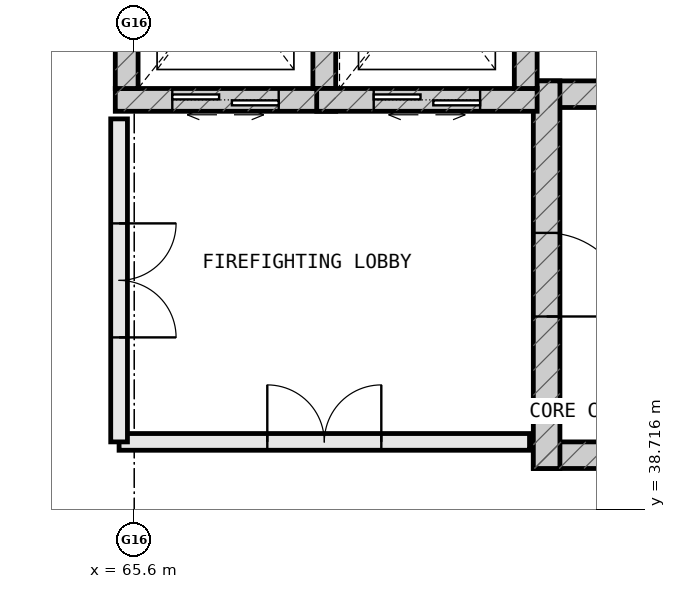
"""IFC4 building model, lengths in metres.
Left out: names, types, materials, properties, quantities, classifications, styles, units other than length and angle.
Written with IfcOpenShell. Run it as: python <this file> out.ifc"""

import sys

from ifc_helpers import new_model, si_unit, direction, frame, frame_2d, origin, place, context, subcontext, project, spatial, rectangle, extrude, element, fill, save


model = new_model("IFC4")
c1 = context("Model", 3, precision=1e-05, world=origin(), true_north=direction((0.0, 1.0)))
c2 = subcontext(c1, "Body", "Model", "MODEL_VIEW")
j1 = project(units=[si_unit("LENGTHUNIT", "METRE"), si_unit("PLANEANGLEUNIT", "RADIAN")], contexts=[c1])
p1 = place(None, origin())
s1 = spatial("IfcSite", under=j1, at=p1, CompositionType="ELEMENT")
p2 = place(p1, origin())
s2 = spatial("IfcBuilding", under=s1, at=p2, CompositionType="ELEMENT")
p3 = place(p2, frame((0.0, 0.0, 42.8)))
s3 = spatial("IfcBuildingStorey", under=s2, at=p3, CompositionType="ELEMENT", Elevation=42.8)
for number, where, z_axis, x_axis in (
    (1, (70.85, 39.425, 0.0), (0.0, 0.0, 1.0), (1.0, 0.0, 0.0)),
    (2, (82.95, 44.175, 0.0), (0.0, 0.0, 1.0), (-1.0, 0.0, 0.0)),
):
    element("IfcWall", number, at=place(p3, frame(where, z_axis=z_axis, x_axis=x_axis)), inside=s3, PredefinedType="SHEAR", context=c2, shape_type="SweptSolid", body=[
        extrude(rectangle(XDim=12.1, YDim=0.35, at=frame_2d((6.05, 0.0))), origin(), (0.0, 0.0, 1.0), 3.8),
    ])
p4 = place(p3, frame((71.025, 44.35, 0.0), z_axis=(0.0, 0.0, 1.0), x_axis=(0.0, -1.0, 0.0)))
e3 = element("IfcWall", 3, at=p4, inside=s3, PredefinedType="SHEAR", context=c2, shape_type="SweptSolid", body=[
    extrude(rectangle(XDim=5.1, YDim=0.35, at=frame_2d((2.55, 0.0))), origin(), (0.0, 0.0, 1.0), 3.8),
])
p5 = place(p4, frame((2.0, 0.0, 0.0)))
e4 = element("IfcOpeningElement", 4, at=p5, cuts=e3, PredefinedType="OPENING", context=c2, shape_type="SweptSolid", body=[
    extrude(rectangle(XDim=1.1, YDim=2.2, at=frame_2d((0.55, 1.1))), frame((0.0, 0.187, 0.0), z_axis=(0.0, -1.0, 0.0), x_axis=(1.0, 0.0, 0.0)), (0.0, 0.0, 1.0), 0.374),
])
p6 = place(p3, frame((65.35, 44.1, 0.0), z_axis=(0.0, 0.0, 1.0), x_axis=(1.0, 0.0, 0.0)))
e5 = element("IfcWall", 5, at=p6, inside=s3, PredefinedType="SHEAR", context=c2, shape_type="SweptSolid", body=[
    extrude(rectangle(XDim=2.9, YDim=0.3, at=frame_2d((1.45, 0.0))), origin(), (0.0, 0.0, 1.0), 3.8),
])
p7 = place(p6, frame((0.75, 0.0, 0.0)))
e6 = element("IfcOpeningElement", 6, at=p7, cuts=e5, PredefinedType="OPENING", context=c2, shape_type="SweptSolid", body=[
    extrude(rectangle(XDim=1.4, YDim=2.2, at=frame_2d((0.7, 1.1))), frame((0.0, 0.162, 0.0), z_axis=(0.0, -1.0, 0.0), x_axis=(1.0, 0.0, 0.0)), (0.0, 0.0, 1.0), 0.324),
])
for number, where, z_axis, x_axis in (
    (7, (68.1, 44.25, 0.0), (0.0, 0.0, 1.0), (0.0, 1.0, 0.0)),
    (8, (65.5, 47.15, 0.0), (0.0, 0.0, 1.0), (0.0, -1.0, 0.0)),
):
    element("IfcWall", number, at=place(p3, frame(where, z_axis=z_axis, x_axis=x_axis)), inside=s3, PredefinedType="SHEAR", context=c2, shape_type="SweptSolid", body=[
        extrude(rectangle(XDim=2.9, YDim=0.3, at=frame_2d((1.45, 0.0))), origin(), (0.0, 0.0, 1.0), 3.8),
    ])
p8 = place(p3, frame((68.0, 44.1, 0.0), z_axis=(0.0, 0.0, 1.0), x_axis=(1.0, 0.0, 0.0)))
e9 = element("IfcWall", 9, at=p8, inside=s3, PredefinedType="SHEAR", context=c2, shape_type="SweptSolid", body=[
    extrude(rectangle(XDim=2.9, YDim=0.3, at=frame_2d((1.45, 0.0))), origin(), (0.0, 0.0, 1.0), 3.8),
])
p9 = place(p8, frame((0.75, 0.0, 0.0)))
e10 = element("IfcOpeningElement", 10, at=p9, cuts=e9, PredefinedType="OPENING", context=c2, shape_type="SweptSolid", body=[
    extrude(rectangle(XDim=1.4, YDim=2.2, at=frame_2d((0.7, 1.1))), frame((0.0, 0.162, 0.0), z_axis=(0.0, -1.0, 0.0), x_axis=(1.0, 0.0, 0.0)), (0.0, 0.0, 1.0), 0.324),
])
p10 = place(p3, frame((70.75, 44.25, 0.0), z_axis=(0.0, 0.0, 1.0), x_axis=(0.0, 1.0, 0.0)))
e11 = element("IfcWall", 11, at=p10, inside=s3, PredefinedType="SHEAR", context=c2, shape_type="SweptSolid", body=[
    extrude(rectangle(XDim=2.9, YDim=0.3, at=frame_2d((1.45, 0.0))), origin(), (0.0, 0.0, 1.0), 3.8),
])
p11 = place(p3, frame((65.4, 39.6, 0.0), z_axis=(0.0, 0.0, 1.0), x_axis=(1.0, 0.0, 0.0)))
e12 = element("IfcWall", 12, at=p11, inside=s3, PredefinedType="STANDARD", context=c2, shape_type="SweptSolid", body=[
    extrude(rectangle(XDim=5.4, YDim=0.22, at=frame_2d((2.7, 0.0))), origin(), (0.0, 0.0, 1.0), 3.54),
])
p12 = place(p11, frame((1.95, 0.0, 0.0)))
e13 = element("IfcOpeningElement", 13, at=p12, cuts=e12, PredefinedType="OPENING", context=c2, shape_type="SweptSolid", body=[
    extrude(rectangle(XDim=1.5, YDim=2.2, at=frame_2d((0.75, 1.1))), frame((0.0, 0.122, 0.0), z_axis=(0.0, -1.0, 0.0), x_axis=(1.0, 0.0, 0.0)), (0.0, 0.0, 1.0), 0.244),
])
p13 = place(p3, frame((65.4, 43.85, 0.0), z_axis=(0.0, 0.0, 1.0), x_axis=(0.0, -1.0, 0.0)))
e14 = element("IfcWall", 14, at=p13, inside=s3, PredefinedType="STANDARD", context=c2, shape_type="SweptSolid", body=[
    extrude(rectangle(XDim=4.25, YDim=0.22, at=frame_2d((2.125, 0.0))), origin(), (0.0, 0.0, 1.0), 3.54),
])
p14 = place(p13, frame((1.375, 0.0, 0.0)))
e15 = element("IfcOpeningElement", 15, at=p14, cuts=e14, PredefinedType="OPENING", context=c2, shape_type="SweptSolid", body=[
    extrude(rectangle(XDim=1.5, YDim=2.2, at=frame_2d((0.75, 1.1))), frame((0.0, 0.122, 0.0), z_axis=(0.0, -1.0, 0.0), x_axis=(1.0, 0.0, 0.0)), (0.0, 0.0, 1.0), 0.244),
])
p15 = place(p5, origin())
e16 = element("IfcDoor", 16, at=p15, inside=s3, OperationType="SINGLE_SWING_RIGHT", PredefinedType="DOOR", context=c2, shape_type="SweptSolid", body=[
    extrude(rectangle(XDim=1.1, YDim=2.2, at=frame_2d((0.55, 1.1))), frame((0.0, 0.025, 0.0), z_axis=(0.0, -1.0, 0.0), x_axis=(1.0, 0.0, 0.0)), (0.0, 0.0, 1.0), 0.05),
])
fill(e4, e16)
p16 = place(p7, origin())
e17 = element("IfcDoor", 17, at=p16, inside=s3, OperationType="DOUBLE_DOOR_SLIDING", PredefinedType="DOOR", context=c2, shape_type="SweptSolid", body=[
    extrude(rectangle(XDim=1.4, YDim=2.2, at=frame_2d((0.7, 1.1))), frame((0.0, 0.025, 0.0), z_axis=(0.0, -1.0, 0.0), x_axis=(1.0, 0.0, 0.0)), (0.0, 0.0, 1.0), 0.05),
])
fill(e6, e17)
p17 = place(p9, origin())
e18 = element("IfcDoor", 18, at=p17, inside=s3, OperationType="DOUBLE_DOOR_SLIDING", PredefinedType="DOOR", context=c2, shape_type="SweptSolid", body=[
    extrude(rectangle(XDim=1.4, YDim=2.2, at=frame_2d((0.7, 1.1))), frame((0.0, 0.025, 0.0), z_axis=(0.0, -1.0, 0.0), x_axis=(1.0, 0.0, 0.0)), (0.0, 0.0, 1.0), 0.05),
])
fill(e10, e18)
p18 = place(p12, origin())
e19 = element("IfcDoor", 19, at=p18, inside=s3, OperationType="DOUBLE_DOOR_SINGLE_SWING", PredefinedType="DOOR", context=c2, shape_type="SweptSolid", body=[
    extrude(rectangle(XDim=1.5, YDim=2.2, at=frame_2d((0.75, 1.1))), frame((0.0, 0.025, 0.0), z_axis=(0.0, -1.0, 0.0), x_axis=(1.0, 0.0, 0.0)), (0.0, 0.0, 1.0), 0.05),
])
fill(e13, e19)
p19 = place(p14, origin())
e20 = element("IfcDoor", 20, at=p19, inside=s3, OperationType="DOUBLE_DOOR_SINGLE_SWING", PredefinedType="DOOR", context=c2, shape_type="SweptSolid", body=[
    extrude(rectangle(XDim=1.5, YDim=2.2, at=frame_2d((0.75, 1.1))), frame((0.0, 0.025, 0.0), z_axis=(0.0, -1.0, 0.0), x_axis=(1.0, 0.0, 0.0)), (0.0, 0.0, 1.0), 0.05),
])
fill(e15, e20)
save(model, sys.argv[1])
